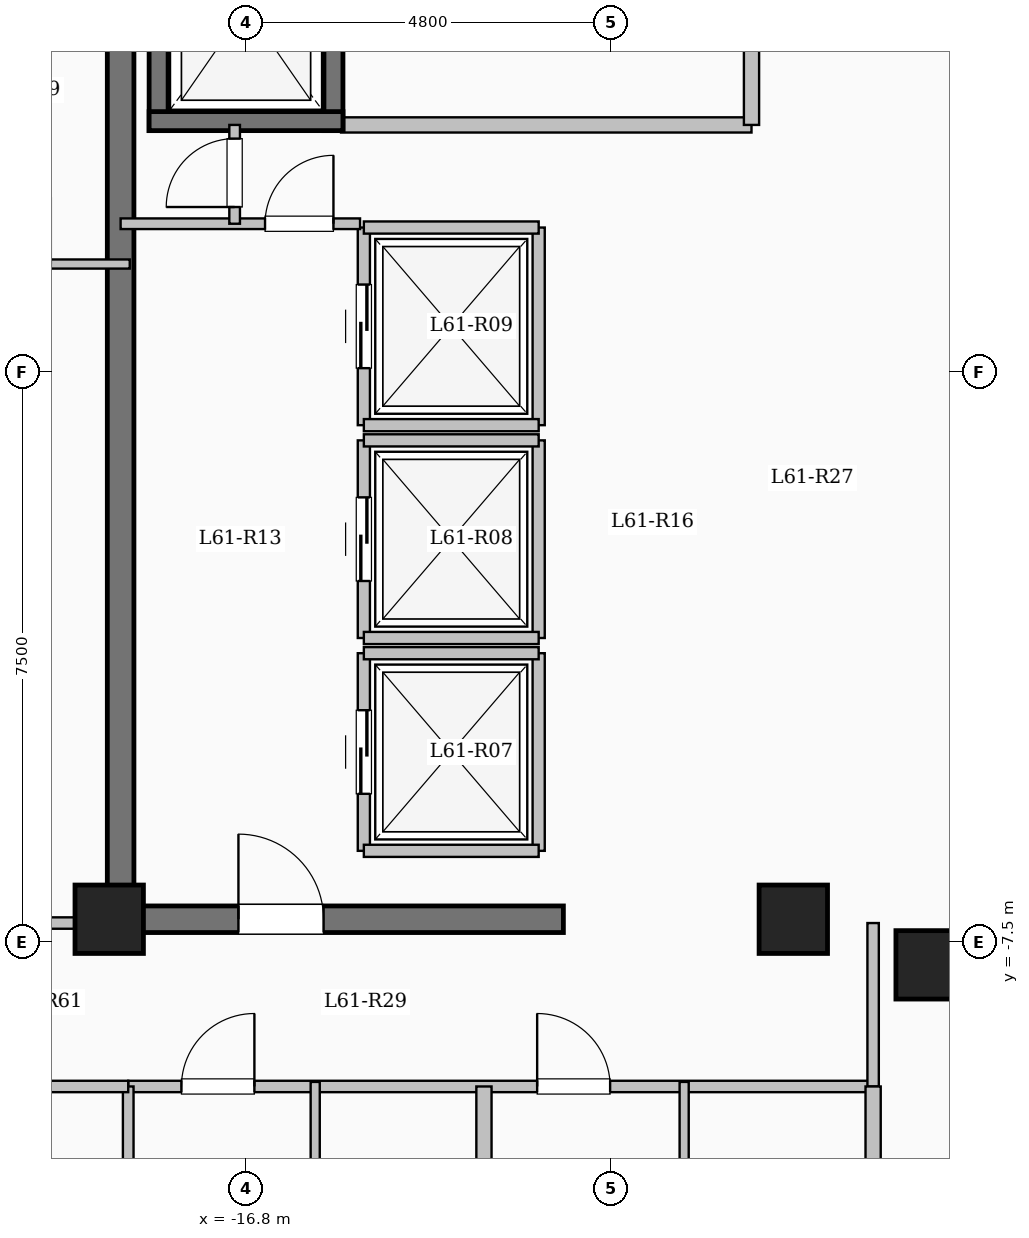
"""IFC4 building model, lengths in metres.
Left out: names, types, materials, properties, quantities, classifications, styles, units other than length and angle.
Written with IfcOpenShell. Run it as: python <this file> out.ifc"""

import sys

from ifc_helpers import new_model, si_unit, direction, frame, frame_2d, origin, origin_2d, place, context, subcontext, project, spatial, rectangle, extrude, element, fill, save


model = new_model("IFC4")
c1 = context("Model", 3, precision=1e-05, world=origin(), true_north=direction((0.0, 1.0)))
c2 = subcontext(c1, "Body", "Model", "MODEL_VIEW")
j1 = project(units=[si_unit("LENGTHUNIT", "METRE"), si_unit("PLANEANGLEUNIT", "RADIAN")], contexts=[c1])
p1 = place(None, origin())
s1 = spatial("IfcSite", under=j1, at=p1, CompositionType="ELEMENT")
p2 = place(p1, origin())
s2 = spatial("IfcBuilding", under=s1, at=p2, CompositionType="ELEMENT")
p3 = place(p2, frame((0.0, 0.0, 223.75)))
s3 = spatial("IfcBuildingStorey", under=s2, at=p3, CompositionType="ELEMENT", Elevation=223.75)
for number, where, z_axis, x_axis in (
    (1, (-7.8, -7.8, 0.0), (0.0, 0.0, 1.0), (1.0, 0.0, 0.0)),
    (2, (-9.6, -7.2, 0.0), (0.0, 0.0, 1.0), (1.0, 0.0, 0.0)),
    (3, (-18.6, -7.2, 0.0), (0.0, 0.0, 1.0), (1.0, 0.0, 0.0)),
):
    element("IfcColumn", number, at=place(p3, frame(where, z_axis=z_axis, x_axis=x_axis)), inside=s3, PredefinedType="COLUMN", context=c2, shape_type="SweptSolid", body=[
        extrude(rectangle(XDim=0.9, YDim=0.9, at=origin_2d()), origin(), (0.0, 0.0, 1.0), 3.35),
    ])
p4 = place(p3, frame((-15.55, 3.25, 0.0), z_axis=(0.0, 0.0, 1.0), x_axis=(1.0, 0.0, 0.0)))
e4 = element("IfcWall", 4, at=p4, inside=s3, PredefinedType="SOLIDWALL", context=c2, shape_type="SweptSolid", body=[
    extrude(rectangle(XDim=5.4, YDim=0.2, at=frame_2d((2.7, 0.0))), origin(), (0.0, 0.0, 1.0), 3.05),
])
p5 = place(p3, frame((-10.15, 3.25, 0.0), z_axis=(0.0, 0.0, 1.0), x_axis=(0.0, 1.0, 0.0)))
e5 = element("IfcWall", 5, at=p5, inside=s3, PredefinedType="SOLIDWALL", context=c2, shape_type="SweptSolid", body=[
    extrude(rectangle(XDim=3.25, YDim=0.2, at=frame_2d((1.625, 0.0))), origin(), (0.0, 0.0, 1.0), 3.05),
])
p6 = place(p5, frame((1.1, 0.0, 0.0)))
e6 = element("IfcOpeningElement", 6, at=p6, cuts=e5, PredefinedType="OPENING", context=c2, shape_type="SweptSolid", body=[
    extrude(rectangle(XDim=1.02, YDim=2.15, at=frame_2d((0.51, 1.075))), frame((0.0, 0.11, 0.0), z_axis=(0.0, -1.0, 0.0), x_axis=(1.0, 0.0, 0.0)), (0.0, 0.0, 1.0), 0.22),
])
p7 = place(p3, frame((-17.95, 3.175, 0.0), z_axis=(0.0, 0.0, 1.0), x_axis=(0.0, 1.0, 0.0)))
e7 = element("IfcWall", 7, at=p7, inside=s3, PredefinedType="SHEAR", context=c2, shape_type="SweptSolid", body=[
    extrude(rectangle(XDim=3.25, YDim=0.25, at=frame_2d((1.625, 0.0))), origin(), (0.0, 0.0, 1.0), 3.35),
])
p8 = place(p3, frame((-15.65, 3.175, 0.0), z_axis=(0.0, 0.0, 1.0), x_axis=(0.0, 1.0, 0.0)))
e8 = element("IfcWall", 8, at=p8, inside=s3, PredefinedType="SHEAR", context=c2, shape_type="SweptSolid", body=[
    extrude(rectangle(XDim=3.25, YDim=0.25, at=frame_2d((1.625, 0.0))), origin(), (0.0, 0.0, 1.0), 3.35),
])
p9 = place(p8, frame((1.075, 0.0, 0.0)))
e9 = element("IfcOpeningElement", 9, at=p9, cuts=e8, PredefinedType="OPENING", context=c2, shape_type="SweptSolid", body=[
    extrude(rectangle(XDim=1.1, YDim=2.15, at=frame_2d((0.55, 1.075))), frame((0.0, 0.135, 0.0), z_axis=(0.0, -1.0, 0.0), x_axis=(1.0, 0.0, 0.0)), (0.0, 0.0, 1.0), 0.27),
])
p10 = place(p3, frame((-18.075, 3.3, 0.0), z_axis=(0.0, 0.0, 1.0), x_axis=(1.0, 0.0, 0.0)))
e10 = element("IfcWall", 10, at=p10, inside=s3, PredefinedType="SHEAR", context=c2, shape_type="SweptSolid", body=[
    extrude(rectangle(XDim=2.55, YDim=0.25, at=frame_2d((1.275, 0.0))), origin(), (0.0, 0.0, 1.0), 3.35),
])
p11 = place(p3, frame((-15.25, -6.3, 0.0), z_axis=(0.0, 0.0, 1.0), x_axis=(0.0, 1.0, 0.0)))
e11 = element("IfcWall", 11, at=p11, inside=s3, PredefinedType="SOLIDWALL", context=c2, shape_type="SweptSolid", body=[
    extrude(rectangle(XDim=2.6, YDim=0.16, at=frame_2d((1.3, 0.0))), origin(), (0.0, 0.0, 1.0), 3.05),
])
p12 = place(p11, frame((0.75, 0.0, 0.0)))
e12 = element("IfcOpeningElement", 12, at=p12, cuts=e11, PredefinedType="OPENING", context=c2, shape_type="SweptSolid", body=[
    extrude(rectangle(XDim=1.1, YDim=2.15, at=frame_2d((0.55, 1.075))), frame((0.0, 0.09, 0.0), z_axis=(0.0, -1.0, 0.0), x_axis=(1.0, 0.0, 0.0)), (0.0, 0.0, 1.0), 0.18),
])
p13 = place(p3, frame((-12.95, -6.3, 0.0), z_axis=(0.0, 0.0, 1.0), x_axis=(0.0, 1.0, 0.0)))
e13 = element("IfcWall", 13, at=p13, inside=s3, PredefinedType="SOLIDWALL", context=c2, shape_type="SweptSolid", body=[
    extrude(rectangle(XDim=2.6, YDim=0.16, at=frame_2d((1.3, 0.0))), origin(), (0.0, 0.0, 1.0), 3.05),
])
for number, where, z_axis, x_axis in (
    (14, (-15.25, -6.3, 0.0), (0.0, 0.0, 1.0), (1.0, 0.0, 0.0)),
    (15, (-15.25, -3.7, 0.0), (0.0, 0.0, 1.0), (1.0, 0.0, 0.0)),
):
    element("IfcWall", number, at=place(p3, frame(where, z_axis=z_axis, x_axis=x_axis)), inside=s3, PredefinedType="SOLIDWALL", context=c2, shape_type="SweptSolid", body=[
        extrude(rectangle(XDim=2.3, YDim=0.16, at=frame_2d((1.15, 0.0))), origin(), (0.0, 0.0, 1.0), 3.05),
    ])
p14 = place(p3, frame((-15.25, -3.5, 0.0), z_axis=(0.0, 0.0, 1.0), x_axis=(0.0, 1.0, 0.0)))
e16 = element("IfcWall", 16, at=p14, inside=s3, PredefinedType="SOLIDWALL", context=c2, shape_type="SweptSolid", body=[
    extrude(rectangle(XDim=2.6, YDim=0.16, at=frame_2d((1.3, 0.0))), origin(), (0.0, 0.0, 1.0), 3.05),
])
p15 = place(p14, frame((0.75, 0.0, 0.0)))
e17 = element("IfcOpeningElement", 17, at=p15, cuts=e16, PredefinedType="OPENING", context=c2, shape_type="SweptSolid", body=[
    extrude(rectangle(XDim=1.1, YDim=2.15, at=frame_2d((0.55, 1.075))), frame((0.0, 0.09, 0.0), z_axis=(0.0, -1.0, 0.0), x_axis=(1.0, 0.0, 0.0)), (0.0, 0.0, 1.0), 0.18),
])
p16 = place(p3, frame((-12.95, -3.5, 0.0), z_axis=(0.0, 0.0, 1.0), x_axis=(0.0, 1.0, 0.0)))
e18 = element("IfcWall", 18, at=p16, inside=s3, PredefinedType="SOLIDWALL", context=c2, shape_type="SweptSolid", body=[
    extrude(rectangle(XDim=2.6, YDim=0.16, at=frame_2d((1.3, 0.0))), origin(), (0.0, 0.0, 1.0), 3.05),
])
for number, where, z_axis, x_axis in (
    (19, (-15.25, -3.5, 0.0), (0.0, 0.0, 1.0), (1.0, 0.0, 0.0)),
    (20, (-15.25, -0.9, 0.0), (0.0, 0.0, 1.0), (1.0, 0.0, 0.0)),
):
    element("IfcWall", number, at=place(p3, frame(where, z_axis=z_axis, x_axis=x_axis)), inside=s3, PredefinedType="SOLIDWALL", context=c2, shape_type="SweptSolid", body=[
        extrude(rectangle(XDim=2.3, YDim=0.16, at=frame_2d((1.15, 0.0))), origin(), (0.0, 0.0, 1.0), 3.05),
    ])
p17 = place(p3, frame((-15.25, -0.7, 0.0), z_axis=(0.0, 0.0, 1.0), x_axis=(0.0, 1.0, 0.0)))
e21 = element("IfcWall", 21, at=p17, inside=s3, PredefinedType="SOLIDWALL", context=c2, shape_type="SweptSolid", body=[
    extrude(rectangle(XDim=2.6, YDim=0.16, at=frame_2d((1.3, 0.0))), origin(), (0.0, 0.0, 1.0), 3.05),
])
p18 = place(p17, frame((0.75, 0.0, 0.0)))
e22 = element("IfcOpeningElement", 22, at=p18, cuts=e21, PredefinedType="OPENING", context=c2, shape_type="SweptSolid", body=[
    extrude(rectangle(XDim=1.1, YDim=2.15, at=frame_2d((0.55, 1.075))), frame((0.0, 0.09, 0.0), z_axis=(0.0, -1.0, 0.0), x_axis=(1.0, 0.0, 0.0)), (0.0, 0.0, 1.0), 0.18),
])
p19 = place(p3, frame((-12.95, -0.7, 0.0), z_axis=(0.0, 0.0, 1.0), x_axis=(0.0, 1.0, 0.0)))
e23 = element("IfcWall", 23, at=p19, inside=s3, PredefinedType="SOLIDWALL", context=c2, shape_type="SweptSolid", body=[
    extrude(rectangle(XDim=2.6, YDim=0.16, at=frame_2d((1.3, 0.0))), origin(), (0.0, 0.0, 1.0), 3.05),
])
for number, where, z_axis, x_axis in (
    (24, (-15.25, -0.7, 0.0), (0.0, 0.0, 1.0), (1.0, 0.0, 0.0)),
    (25, (-15.25, 1.9, 0.0), (0.0, 0.0, 1.0), (1.0, 0.0, 0.0)),
):
    element("IfcWall", number, at=place(p3, frame(where, z_axis=z_axis, x_axis=x_axis)), inside=s3, PredefinedType="SOLIDWALL", context=c2, shape_type="SweptSolid", body=[
        extrude(rectangle(XDim=2.3, YDim=0.16, at=frame_2d((1.15, 0.0))), origin(), (0.0, 0.0, 1.0), 3.05),
    ])
p20 = place(p3, frame((-18.45, -7.375, 0.0), z_axis=(0.0, 0.0, 1.0), x_axis=(0.0, 1.0, 0.0)))
e26 = element("IfcWall", 26, at=p20, inside=s3, PredefinedType="SHEAR", context=c2, shape_type="SweptSolid", body=[
    extrude(rectangle(XDim=14.05, YDim=0.35, at=frame_2d((7.025, 0.0))), origin(), (0.0, 0.0, 1.0), 3.35),
])
p21 = place(p3, frame((-18.625, -7.2, 0.0), z_axis=(0.0, 0.0, 1.0), x_axis=(1.0, 0.0, 0.0)))
e27 = element("IfcWall", 27, at=p21, inside=s3, PredefinedType="SHEAR", context=c2, shape_type="SweptSolid", body=[
    extrude(rectangle(XDim=6.0, YDim=0.35, at=frame_2d((3.0, 0.0))), origin(), (0.0, 0.0, 1.0), 3.35),
])
p22 = place(p21, frame((1.725, 0.0, 0.0)))
e28 = element("IfcOpeningElement", 28, at=p22, cuts=e27, PredefinedType="OPENING", context=c2, shape_type="SweptSolid", body=[
    extrude(rectangle(XDim=1.12, YDim=2.15, at=frame_2d((0.56, 1.075))), frame((0.0, 0.185, 0.0), z_axis=(0.0, -1.0, 0.0), x_axis=(1.0, 0.0, 0.0)), (0.0, 0.0, 1.0), 0.37),
])
p23 = place(p3, frame((-18.45, 1.95, 0.0), z_axis=(0.0, 0.0, 1.0), x_axis=(1.0, 0.0, 0.0)))
e29 = element("IfcWall", 29, at=p23, inside=s3, PredefinedType="PARTITIONING", context=c2, shape_type="SweptSolid", body=[
    extrude(rectangle(XDim=3.15, YDim=0.14, at=frame_2d((1.575, 0.0))), origin(), (0.0, 0.0, 1.0), 3.05),
])
p24 = place(p23, frame((1.9, 0.0, 0.0)))
e30 = element("IfcOpeningElement", 30, at=p24, cuts=e29, PredefinedType="OPENING", context=c2, shape_type="SweptSolid", body=[
    extrude(rectangle(XDim=0.9, YDim=2.08, at=frame_2d((0.45, 1.04))), frame((0.0, 0.08, 0.0), z_axis=(0.0, -1.0, 0.0), x_axis=(1.0, 0.0, 0.0)), (0.0, 0.0, 1.0), 0.16),
])
p25 = place(p3, frame((-16.95, 1.95, 0.0), z_axis=(0.0, 0.0, 1.0), x_axis=(0.0, 1.0, 0.0)))
e31 = element("IfcWall", 31, at=p25, inside=s3, PredefinedType="PARTITIONING", context=c2, shape_type="SweptSolid", body=[
    extrude(rectangle(XDim=1.3, YDim=0.14, at=frame_2d((0.65, 0.0))), origin(), (0.0, 0.0, 1.0), 3.05),
])
p26 = place(p25, frame((0.22, 0.0, 0.0)))
e32 = element("IfcOpeningElement", 32, at=p26, cuts=e31, PredefinedType="OPENING", context=c2, shape_type="SweptSolid", body=[
    extrude(rectangle(XDim=0.9, YDim=2.08, at=frame_2d((0.45, 1.04))), frame((0.0, 0.08, 0.0), z_axis=(0.0, -1.0, 0.0), x_axis=(1.0, 0.0, 0.0)), (0.0, 0.0, 1.0), 0.16),
])
p27 = place(p3, frame((-18.35, -9.4, 0.0), z_axis=(0.0, 0.0, 1.0), x_axis=(1.0, 0.0, 0.0)))
e33 = element("IfcWall", 33, at=p27, inside=s3, PredefinedType="PARTITIONING", context=c2, shape_type="SweptSolid", body=[
    extrude(rectangle(XDim=9.8, YDim=0.15, at=frame_2d((4.9, 0.0))), origin(), (0.0, 0.0, 1.0), 3.05),
])
p28 = place(p27, frame((0.7, 0.0, 0.0)))
e34 = element("IfcOpeningElement", 34, at=p28, cuts=e33, PredefinedType="OPENING", context=c2, shape_type="SweptSolid", body=[
    extrude(rectangle(XDim=0.96, YDim=2.15, at=frame_2d((0.48, 1.075))), frame((0.0, 0.085, 0.0), z_axis=(0.0, -1.0, 0.0), x_axis=(1.0, 0.0, 0.0)), (0.0, 0.0, 1.0), 0.17),
])
p29 = place(p27, frame((5.38, 0.0, 0.0)))
e35 = element("IfcOpeningElement", 35, at=p29, cuts=e33, PredefinedType="OPENING", context=c2, shape_type="SweptSolid", body=[
    extrude(rectangle(XDim=0.96, YDim=2.15, at=frame_2d((0.48, 1.075))), frame((0.0, 0.085, 0.0), z_axis=(0.0, -1.0, 0.0), x_axis=(1.0, 0.0, 0.0)), (0.0, 0.0, 1.0), 0.17),
])
p30 = place(p3, frame((-8.55, -9.4, 0.0), z_axis=(0.0, 0.0, 1.0), x_axis=(0.0, 1.0, 0.0)))
e36 = element("IfcWall", 36, at=p30, inside=s3, PredefinedType="PARTITIONING", context=c2, shape_type="SweptSolid", body=[
    extrude(rectangle(XDim=2.15, YDim=0.15, at=frame_2d((1.075, 0.0))), origin(), (0.0, 0.0, 1.0), 3.05),
])
p31 = place(p3, frame((-13.67, -20.9, 0.0), z_axis=(0.0, 0.0, 1.0), x_axis=(0.0, 1.0, 0.0)))
e37 = element("IfcWall", 37, at=p31, inside=s3, PredefinedType="SOLIDWALL", context=c2, shape_type="SweptSolid", body=[
    extrude(rectangle(XDim=11.5, YDim=0.2, at=frame_2d((5.75, 0.0))), origin(), (0.0, 0.0, 1.0), 3.05),
])
p32 = place(p3, frame((-15.89, -12.56, 0.0), z_axis=(0.0, 0.0, 1.0), x_axis=(0.0, 1.0, 0.0)))
e38 = element("IfcWall", 38, at=p32, inside=s3, PredefinedType="PARTITIONING", context=c2, shape_type="SweptSolid", body=[
    extrude(rectangle(XDim=3.22, YDim=0.12, at=frame_2d((1.61, 0.0))), origin(), (0.0, 0.0, 1.0), 3.05),
])
p33 = place(p32, frame((1.14, 0.0, 0.0)))
e39 = element("IfcOpeningElement", 39, at=p33, cuts=e38, PredefinedType="OPENING", context=c2, shape_type="SweptSolid", body=[
    extrude(rectangle(XDim=0.88, YDim=2.1, at=frame_2d((0.44, 1.05))), frame((0.0, 0.07, 0.0), z_axis=(0.0, -1.0, 0.0), x_axis=(1.0, 0.0, 0.0)), (0.0, 0.0, 1.0), 0.14),
])
p34 = place(p3, frame((-11.036, -12.56, 0.0), z_axis=(0.0, 0.0, 1.0), x_axis=(0.0, 1.0, 0.0)))
e40 = element("IfcWall", 40, at=p34, inside=s3, PredefinedType="PARTITIONING", context=c2, shape_type="SweptSolid", body=[
    extrude(rectangle(XDim=3.22, YDim=0.12, at=frame_2d((1.61, 0.0))), origin(), (0.0, 0.0, 1.0), 3.05),
])
p35 = place(p34, frame((1.14, 0.0, 0.0)))
e41 = element("IfcOpeningElement", 41, at=p35, cuts=e40, PredefinedType="OPENING", context=c2, shape_type="SweptSolid", body=[
    extrude(rectangle(XDim=0.88, YDim=2.1, at=frame_2d((0.44, 1.05))), frame((0.0, 0.07, 0.0), z_axis=(0.0, -1.0, 0.0), x_axis=(1.0, 0.0, 0.0)), (0.0, 0.0, 1.0), 0.14),
])
p36 = place(p3, frame((-8.55, -21.504, 0.0), z_axis=(0.0, 0.0, 1.0), x_axis=(0.0, 1.0, 0.0)))
e42 = element("IfcWall", 42, at=p36, inside=s3, PredefinedType="SOLIDWALL", context=c2, shape_type="SweptSolid", body=[
    extrude(rectangle(XDim=12.104, YDim=0.2, at=frame_2d((6.052, 0.0))), origin(), (0.0, 0.0, 1.0), 3.05),
])
p37 = place(p3, frame((-23.58, -7.25, 0.0), z_axis=(0.0, 0.0, 1.0), x_axis=(1.0, 0.0, 0.0)))
e43 = element("IfcWall", 43, at=p37, inside=s3, PredefinedType="PARTITIONING", context=c2, shape_type="SweptSolid", body=[
    extrude(rectangle(XDim=5.13, YDim=0.15, at=frame_2d((2.565, 0.0))), origin(), (0.0, 0.0, 1.0), 3.05),
])
p38 = place(p37, frame((2.18, 0.0, 0.0)))
e44 = element("IfcOpeningElement", 44, at=p38, cuts=e43, PredefinedType="OPENING", context=c2, shape_type="SweptSolid", body=[
    extrude(rectangle(XDim=0.96, YDim=2.15, at=frame_2d((0.48, 1.075))), frame((0.0, 0.085, 0.0), z_axis=(0.0, -1.0, 0.0), x_axis=(1.0, 0.0, 0.0)), (0.0, 0.0, 1.0), 0.17),
])
p39 = place(p3, frame((-18.35, -17.25, 0.0), z_axis=(0.0, 0.0, 1.0), x_axis=(0.0, 1.0, 0.0)))
e45 = element("IfcWall", 45, at=p39, inside=s3, PredefinedType="PARTITIONING", context=c2, shape_type="SweptSolid", body=[
    extrude(rectangle(XDim=7.85, YDim=0.14, at=frame_2d((3.925, 0.0))), origin(), (0.0, 0.0, 1.0), 3.05),
])
p40 = place(p3, frame((-23.58, -9.4, 0.0), z_axis=(0.0, 0.0, 1.0), x_axis=(1.0, 0.0, 0.0)))
e46 = element("IfcWall", 46, at=p40, inside=s3, PredefinedType="PARTITIONING", context=c2, shape_type="SweptSolid", body=[
    extrude(rectangle(XDim=5.23, YDim=0.15, at=frame_2d((2.615, 0.0))), origin(), (0.0, 0.0, 1.0), 3.05),
])
p41 = place(p40, frame((2.14, 0.0, 0.0)))
e47 = element("IfcOpeningElement", 47, at=p41, cuts=e46, PredefinedType="OPENING", context=c2, shape_type="SweptSolid", body=[
    extrude(rectangle(XDim=0.95, YDim=2.15, at=frame_2d((0.475, 1.075))), frame((0.0, 0.085, 0.0), z_axis=(0.0, -1.0, 0.0), x_axis=(1.0, 0.0, 0.0)), (0.0, 0.0, 1.0), 0.17),
])
p42 = place(p3, frame((-23.7, 1.42, 0.0), z_axis=(0.0, 0.0, 1.0), x_axis=(1.0, 0.0, 0.0)))
e48 = element("IfcWall", 48, at=p42, inside=s3, PredefinedType="PARTITIONING", context=c2, shape_type="SweptSolid", body=[
    extrude(rectangle(XDim=5.37, YDim=0.12, at=frame_2d((2.685, 0.0))), origin(), (0.0, 0.0, 1.0), 3.05),
])
p43 = place(p42, frame((0.937, 0.0, 0.0)))
e49 = element("IfcOpeningElement", 49, at=p43, cuts=e48, PredefinedType="OPENING", context=c2, shape_type="SweptSolid", body=[
    extrude(rectangle(XDim=0.88, YDim=2.1, at=frame_2d((0.44, 1.05))), frame((0.0, 0.07, 0.0), z_axis=(0.0, -1.0, 0.0), x_axis=(1.0, 0.0, 0.0)), (0.0, 0.0, 1.0), 0.14),
])
p44 = place(p42, frame((3.452, 0.0, 0.0)))
e50 = element("IfcOpeningElement", 50, at=p44, cuts=e48, PredefinedType="OPENING", context=c2, shape_type="SweptSolid", body=[
    extrude(rectangle(XDim=0.88, YDim=2.1, at=frame_2d((0.44, 1.05))), frame((0.0, 0.07, 0.0), z_axis=(0.0, -1.0, 0.0), x_axis=(1.0, 0.0, 0.0)), (0.0, 0.0, 1.0), 0.14),
])
p45 = place(p12, origin())
e51 = element("IfcDoor", 51, at=p45, inside=s3, OperationType="SLIDING_TO_LEFT", PredefinedType="DOOR", context=c2, shape_type="SweptSolid", body=[
    extrude(rectangle(XDim=1.1, YDim=2.15, at=frame_2d((0.55, 1.075))), frame((0.0, 0.025, 0.0), z_axis=(0.0, -1.0, 0.0), x_axis=(1.0, 0.0, 0.0)), (0.0, 0.0, 1.0), 0.05),
])
fill(e12, e51)
p46 = place(p15, origin())
e52 = element("IfcDoor", 52, at=p46, inside=s3, OperationType="SLIDING_TO_LEFT", PredefinedType="DOOR", context=c2, shape_type="SweptSolid", body=[
    extrude(rectangle(XDim=1.1, YDim=2.15, at=frame_2d((0.55, 1.075))), frame((0.0, 0.025, 0.0), z_axis=(0.0, -1.0, 0.0), x_axis=(1.0, 0.0, 0.0)), (0.0, 0.0, 1.0), 0.05),
])
fill(e17, e52)
p47 = place(p18, origin())
e53 = element("IfcDoor", 53, at=p47, inside=s3, OperationType="SLIDING_TO_LEFT", PredefinedType="DOOR", context=c2, shape_type="SweptSolid", body=[
    extrude(rectangle(XDim=1.1, YDim=2.15, at=frame_2d((0.55, 1.075))), frame((0.0, 0.025, 0.0), z_axis=(0.0, -1.0, 0.0), x_axis=(1.0, 0.0, 0.0)), (0.0, 0.0, 1.0), 0.05),
])
fill(e22, e53)
p48 = place(p22, origin())
e54 = element("IfcDoor", 54, at=p48, inside=s3, OperationType="SINGLE_SWING_LEFT", PredefinedType="DOOR", context=c2, shape_type="SweptSolid", body=[
    extrude(rectangle(XDim=1.12, YDim=2.15, at=frame_2d((0.56, 1.075))), frame((0.0, 0.025, 0.0), z_axis=(0.0, -1.0, 0.0), x_axis=(1.0, 0.0, 0.0)), (0.0, 0.0, 1.0), 0.05),
])
fill(e28, e54)
p49 = place(p24, origin())
e55 = element("IfcDoor", 55, at=p49, inside=s3, OperationType="SINGLE_SWING_RIGHT", PredefinedType="DOOR", context=c2, shape_type="SweptSolid", body=[
    extrude(rectangle(XDim=0.9, YDim=2.08, at=frame_2d((0.45, 1.04))), frame((0.0, 0.025, 0.0), z_axis=(0.0, -1.0, 0.0), x_axis=(1.0, 0.0, 0.0)), (0.0, 0.0, 1.0), 0.05),
])
fill(e30, e55)
p50 = place(p26, origin())
e56 = element("IfcDoor", 56, at=p50, inside=s3, OperationType="SINGLE_SWING_LEFT", PredefinedType="DOOR", context=c2, shape_type="SweptSolid", body=[
    extrude(rectangle(XDim=0.9, YDim=2.08, at=frame_2d((0.45, 1.04))), frame((0.0, 0.025, 0.0), z_axis=(0.0, -1.0, 0.0), x_axis=(1.0, 0.0, 0.0)), (0.0, 0.0, 1.0), 0.05),
])
fill(e32, e56)
p51 = place(p28, origin())
e57 = element("IfcDoor", 57, at=p51, inside=s3, OperationType="SINGLE_SWING_RIGHT", PredefinedType="DOOR", context=c2, shape_type="SweptSolid", body=[
    extrude(rectangle(XDim=0.96, YDim=2.15, at=frame_2d((0.48, 1.075))), frame((0.0, 0.025, 0.0), z_axis=(0.0, -1.0, 0.0), x_axis=(1.0, 0.0, 0.0)), (0.0, 0.0, 1.0), 0.05),
])
fill(e34, e57)
p52 = place(p29, origin())
e58 = element("IfcDoor", 58, at=p52, inside=s3, OperationType="SINGLE_SWING_LEFT", PredefinedType="DOOR", context=c2, shape_type="SweptSolid", body=[
    extrude(rectangle(XDim=0.96, YDim=2.15, at=frame_2d((0.48, 1.075))), frame((0.0, 0.025, 0.0), z_axis=(0.0, -1.0, 0.0), x_axis=(1.0, 0.0, 0.0)), (0.0, 0.0, 1.0), 0.05),
])
fill(e35, e58)
save(model, sys.argv[1])
